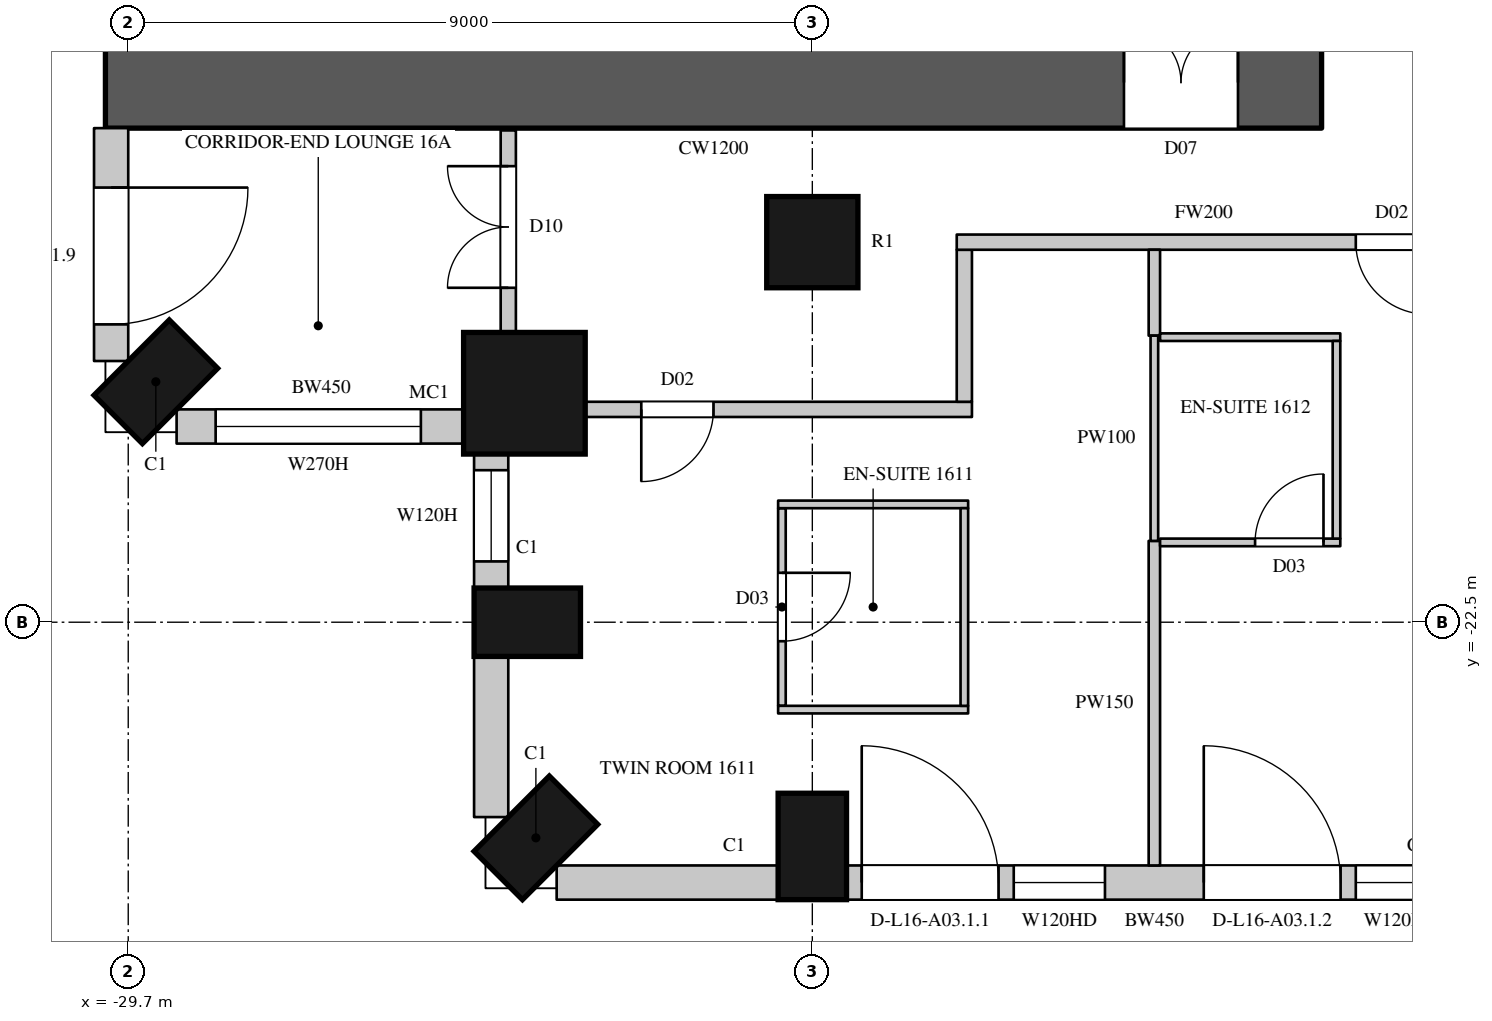
"""IFC4 building model, lengths in metres.
Left out: names, types, materials, properties, quantities, classifications, styles, units other than length and angle.
Written with IfcOpenShell. Run it as: python <this file> out.ifc"""

import sys

from ifc_helpers import new_model, si_unit, direction, frame, frame_2d, origin, origin_2d, place, context, subcontext, project, spatial, rectangle, circle, extrude, element, fill, save


model = new_model("IFC4")
c1 = context("Model", 3, precision=1e-05, world=origin(), true_north=direction((0.0, 1.0)))
c2 = subcontext(c1, "Body", "Model", "MODEL_VIEW")
j1 = project(units=[si_unit("LENGTHUNIT", "METRE"), si_unit("PLANEANGLEUNIT", "RADIAN")], contexts=[c1])
p1 = place(None, origin())
s1 = spatial("IfcSite", under=j1, at=p1, CompositionType="ELEMENT")
p2 = place(p1, origin())
s2 = spatial("IfcBuilding", under=s1, at=p2, CompositionType="ELEMENT")
p3 = place(p2, frame((0.0, 0.0, 87.9)))
s3 = spatial("IfcBuildingStorey", under=s2, at=p3, CompositionType="ELEMENT", Elevation=87.9)
p4 = place(p3, frame((-29.337, -19.337, 0.0), z_axis=(0.0, 0.0, 1.0), x_axis=(0.707106781187, -0.707106781187, 0.0)))
e1 = element("IfcColumn", 1, at=p4, inside=s3, PredefinedType="COLUMN", context=c2, shape_type="SweptSolid", body=[
    extrude(rectangle(XDim=0.9, YDim=1.4, at=origin_2d()), origin(), (0.0, 0.0, 1.0), 3.6),
])
p5 = place(p3, frame((-24.488, -19.488, 0.0), z_axis=(0.0, 0.0, 1.0), x_axis=(1.0, 0.0, 0.0)))
e2 = element("IfcColumn", 2, at=p5, inside=s3, PredefinedType="COLUMN", context=c2, shape_type="SweptSolid", body=[
    extrude(circle(Radius=0.8, at=origin_2d()), origin(), (0.0, 0.0, 1.0), 3.6),
])
for number, where, z_axis, x_axis in (
    (3, (-24.45, -22.5, 0.0), (0.0, 0.0, 1.0), (0.0, -1.0, 0.0)),
    (4, (-24.337, -25.337, 0.0), (0.0, 0.0, 1.0), (0.707, -0.707, 0.0)),
    (5, (-20.7, -25.45, 0.0), (0.0, 0.0, 1.0), (1.0, 0.0, 0.0)),
):
    element("IfcColumn", number, at=place(p3, frame(where, z_axis=z_axis, x_axis=x_axis)), inside=s3, PredefinedType="COLUMN", context=c2, shape_type="SweptSolid", body=[
        extrude(rectangle(XDim=0.9, YDim=1.4, at=origin_2d()), origin(), (0.0, 0.0, 1.0), 3.6),
    ])
p6 = place(p3, frame((-20.7, -17.5, 0.0), z_axis=(0.0, 0.0, 1.0), x_axis=(1.0, 0.0, 0.0)))
e6 = element("IfcColumn", 6, at=p6, inside=s3, PredefinedType="COLUMN", context=c2, shape_type="SweptSolid", body=[
    extrude(circle(Radius=0.6, at=origin_2d()), origin(), (0.0, 0.0, 1.0), 3.6),
])
p7 = place(p3, frame((-29.925, -16.0, 0.0), z_axis=(0.0, 0.0, 1.0), x_axis=(0.0, -1.0, 0.0)))
e7 = element("IfcWall", 7, at=p7, inside=s3, PredefinedType="SOLIDWALL", context=c2, shape_type="SweptSolid", body=[
    extrude(rectangle(XDim=3.064, YDim=0.45, at=frame_2d((1.532, 0.0))), origin(), (0.0, 0.0, 1.0), 3.3),
])
p8 = place(p7, frame((0.782, 0.0, 0.0)))
e8 = element("IfcOpeningElement", 8, at=p8, cuts=e7, PredefinedType="OPENING", context=c2, shape_type="SweptSolid", body=[
    extrude(rectangle(XDim=1.8, YDim=2.4, at=frame_2d((0.9, 1.2))), frame((0.0, 0.235, 0.0), z_axis=(0.0, -1.0, 0.0), x_axis=(1.0, 0.0, 0.0)), (0.0, 0.0, 1.0), 0.47),
])
p9 = place(p3, frame((-29.064, -19.925, 0.0), z_axis=(0.0, 0.0, 1.0), x_axis=(1.0, 0.0, 0.0)))
e9 = element("IfcWall", 9, at=p9, inside=s3, PredefinedType="SOLIDWALL", context=c2, shape_type="SweptSolid", body=[
    extrude(rectangle(XDim=3.805, YDim=0.45, at=frame_2d((1.903, 0.0))), origin(), (0.0, 0.0, 1.0), 3.3),
])
p10 = place(p9, frame((0.514, 0.0, 1.05)))
e10 = element("IfcOpeningElement", 10, at=p10, cuts=e9, PredefinedType="OPENING", context=c2, shape_type="SweptSolid", body=[
    extrude(rectangle(XDim=2.7, YDim=2.0, at=frame_2d((1.35, 1.0))), frame((0.0, 0.235, 0.0), z_axis=(0.0, -1.0, 0.0), x_axis=(1.0, 0.0, 0.0)), (0.0, 0.0, 1.0), 0.47),
])
p11 = place(p3, frame((-24.925, -20.259, 0.0), z_axis=(0.0, 0.0, 1.0), x_axis=(0.0, -1.0, 0.0)))
e11 = element("IfcWall", 11, at=p11, inside=s3, PredefinedType="SOLIDWALL", context=c2, shape_type="SweptSolid", body=[
    extrude(rectangle(XDim=1.792, YDim=0.45, at=frame_2d((0.896, 0.0))), origin(), (0.0, 0.0, 1.0), 3.3),
])
p12 = place(p11, frame((0.241, 0.0, 1.05)))
e12 = element("IfcOpeningElement", 12, at=p12, cuts=e11, PredefinedType="OPENING", context=c2, shape_type="SweptSolid", body=[
    extrude(rectangle(XDim=1.2, YDim=2.0, at=frame_2d((0.6, 1.0))), frame((0.0, 0.235, 0.0), z_axis=(0.0, -1.0, 0.0), x_axis=(1.0, 0.0, 0.0)), (0.0, 0.0, 1.0), 0.47),
])
p13 = place(p3, frame((-24.925, -22.95, 0.0), z_axis=(0.0, 0.0, 1.0), x_axis=(0.0, -1.0, 0.0)))
e13 = element("IfcWall", 13, at=p13, inside=s3, PredefinedType="SOLIDWALL", context=c2, shape_type="SweptSolid", body=[
    extrude(rectangle(XDim=2.114, YDim=0.45, at=frame_2d((1.057, 0.0))), origin(), (0.0, 0.0, 1.0), 3.3),
])
p14 = place(p3, frame((-24.064, -25.925, 0.0), z_axis=(0.0, 0.0, 1.0), x_axis=(1.0, 0.0, 0.0)))
e14 = element("IfcWall", 14, at=p14, inside=s3, PredefinedType="SOLIDWALL", context=c2, shape_type="SweptSolid", body=[
    extrude(rectangle(XDim=2.914, YDim=0.45, at=frame_2d((1.457, 0.0))), origin(), (0.0, 0.0, 1.0), 3.3),
])
p15 = place(p3, frame((-20.25, -25.925, 0.0), z_axis=(0.0, 0.0, 1.0), x_axis=(1.0, 0.0, 0.0)))
e15 = element("IfcWall", 15, at=p15, inside=s3, PredefinedType="SOLIDWALL", context=c2, shape_type="SweptSolid", body=[
    extrude(rectangle(XDim=8.1, YDim=0.45, at=frame_2d((4.05, 0.0))), origin(), (0.0, 0.0, 1.0), 3.3),
])
p16 = place(p15, frame((0.2, 0.0, 0.0)))
e16 = element("IfcOpeningElement", 16, at=p16, cuts=e15, PredefinedType="OPENING", context=c2, shape_type="SweptSolid", body=[
    extrude(rectangle(XDim=1.8, YDim=2.4, at=frame_2d((0.9, 1.2))), frame((0.0, 0.235, 0.0), z_axis=(0.0, -1.0, 0.0), x_axis=(1.0, 0.0, 0.0)), (0.0, 0.0, 1.0), 0.47),
])
p17 = place(p15, frame((2.2, 0.0, 1.05)))
e17 = element("IfcOpeningElement", 17, at=p17, cuts=e15, PredefinedType="OPENING", context=c2, shape_type="SweptSolid", body=[
    extrude(rectangle(XDim=1.2, YDim=2.0, at=frame_2d((0.6, 1.0))), frame((0.0, 0.235, 0.0), z_axis=(0.0, -1.0, 0.0), x_axis=(1.0, 0.0, 0.0)), (0.0, 0.0, 1.0), 0.47),
])
p18 = place(p15, frame((4.7, 0.0, 0.0)))
e18 = element("IfcOpeningElement", 18, at=p18, cuts=e15, PredefinedType="OPENING", context=c2, shape_type="SweptSolid", body=[
    extrude(rectangle(XDim=1.8, YDim=2.4, at=frame_2d((0.9, 1.2))), frame((0.0, 0.235, 0.0), z_axis=(0.0, -1.0, 0.0), x_axis=(1.0, 0.0, 0.0)), (0.0, 0.0, 1.0), 0.47),
])
p19 = place(p15, frame((6.7, 0.0, 1.05)))
e19 = element("IfcOpeningElement", 19, at=p19, cuts=e15, PredefinedType="OPENING", context=c2, shape_type="SweptSolid", body=[
    extrude(rectangle(XDim=1.2, YDim=2.0, at=frame_2d((0.6, 1.0))), frame((0.0, 0.235, 0.0), z_axis=(0.0, -1.0, 0.0), x_axis=(1.0, 0.0, 0.0)), (0.0, 0.0, 1.0), 0.47),
])
p20 = place(p3, frame((-30.0, -15.4, 0.0), z_axis=(0.0, 0.0, 1.0), x_axis=(1.0, 0.0, 0.0)))
e20 = element("IfcWall", 20, at=p20, inside=s3, PredefinedType="SHEAR", context=c2, shape_type="SweptSolid", body=[
    extrude(rectangle(XDim=16.0, YDim=1.2, at=frame_2d((8.0, 0.0))), origin(), (0.0, 0.0, 1.0), 3.6),
])
p21 = place(p20, frame((13.4, 0.0, 0.0)))
e21 = element("IfcOpeningElement", 21, at=p21, cuts=e20, PredefinedType="OPENING", context=c2, shape_type="SweptSolid", body=[
    extrude(rectangle(XDim=1.5, YDim=2.4, at=frame_2d((0.75, 1.2))), frame((0.0, 0.61, 0.0), z_axis=(0.0, -1.0, 0.0), x_axis=(1.0, 0.0, 0.0)), (0.0, 0.0, 1.0), 1.22),
])
p22 = place(p3, frame((-24.7, -18.7, 0.0), z_axis=(0.0, 0.0, 1.0), x_axis=(0.0, 1.0, 0.0)))
e22 = element("IfcWall", 22, at=p22, inside=s3, PredefinedType="PARTITIONING", context=c2, shape_type="SweptSolid", body=[
    extrude(rectangle(XDim=2.67, YDim=0.2, at=frame_2d((1.335, 0.0))), origin(), (0.0, 0.0, 1.0), 3.3),
])
p23 = place(p22, frame((0.6, 0.0, 0.0)))
e23 = element("IfcOpeningElement", 23, at=p23, cuts=e22, PredefinedType="OPENING", context=c2, shape_type="SweptSolid", body=[
    extrude(rectangle(XDim=1.6, YDim=2.4, at=frame_2d((0.8, 1.2))), frame((0.0, 0.11, 0.0), z_axis=(0.0, -1.0, 0.0), x_axis=(1.0, 0.0, 0.0)), (0.0, 0.0, 1.0), 0.22),
])
p24 = place(p3, frame((-23.7, -19.7, 0.0), z_axis=(0.0, 0.0, 1.0), x_axis=(1.0, 0.0, 0.0)))
e24 = element("IfcWall", 24, at=p24, inside=s3, PredefinedType="PARTITIONING", context=c2, shape_type="SweptSolid", body=[
    extrude(rectangle(XDim=5.1, YDim=0.2, at=frame_2d((2.55, 0.0))), origin(), (0.0, 0.0, 1.0), 3.3),
])
p25 = place(p24, frame((0.75, 0.0, 0.0)))
e25 = element("IfcOpeningElement", 25, at=p25, cuts=e24, PredefinedType="OPENING", context=c2, shape_type="SweptSolid", body=[
    extrude(rectangle(XDim=0.95, YDim=2.2, at=frame_2d((0.475, 1.1))), frame((0.0, 0.11, 0.0), z_axis=(0.0, -1.0, 0.0), x_axis=(1.0, 0.0, 0.0)), (0.0, 0.0, 1.0), 0.22),
])
p26 = place(p3, frame((-18.7, -19.6, 0.0), z_axis=(0.0, 0.0, 1.0), x_axis=(0.0, 1.0, 0.0)))
e26 = element("IfcWall", 26, at=p26, inside=s3, PredefinedType="PARTITIONING", context=c2, shape_type="SweptSolid", body=[
    extrude(rectangle(XDim=2.0, YDim=0.2, at=frame_2d((1.0, 0.0))), origin(), (0.0, 0.0, 1.0), 3.3),
])
p27 = place(p3, frame((-18.8, -17.5, 0.0), z_axis=(0.0, 0.0, 1.0), x_axis=(1.0, 0.0, 0.0)))
e27 = element("IfcWall", 27, at=p27, inside=s3, PredefinedType="PARTITIONING", context=c2, shape_type="SweptSolid", body=[
    extrude(rectangle(XDim=6.5, YDim=0.2, at=frame_2d((3.25, 0.0))), origin(), (0.0, 0.0, 1.0), 2.75),
])
p28 = place(p27, frame((5.25, 0.0, 0.0)))
e28 = element("IfcOpeningElement", 28, at=p28, cuts=e27, PredefinedType="OPENING", context=c2, shape_type="SweptSolid", body=[
    extrude(rectangle(XDim=0.95, YDim=2.2, at=frame_2d((0.475, 1.1))), frame((0.0, 0.11, 0.0), z_axis=(0.0, -1.0, 0.0), x_axis=(1.0, 0.0, 0.0)), (0.0, 0.0, 1.0), 0.22),
])
p29 = place(p3, frame((-16.2, -25.7, 0.0), z_axis=(0.0, 0.0, 1.0), x_axis=(0.0, 1.0, 0.0)))
e29 = element("IfcWall", 29, at=p29, inside=s3, PredefinedType="PARTITIONING", context=c2, shape_type="SweptSolid", body=[
    extrude(rectangle(XDim=4.27, YDim=0.15, at=frame_2d((2.135, 0.0))), origin(), (0.0, 0.0, 1.0), 2.65),
])
p30 = place(p3, frame((-16.2, -18.73, 0.0), z_axis=(0.0, 0.0, 1.0), x_axis=(0.0, 1.0, 0.0)))
e30 = element("IfcWall", 30, at=p30, inside=s3, PredefinedType="PARTITIONING", context=c2, shape_type="SweptSolid", body=[
    extrude(rectangle(XDim=1.13, YDim=0.15, at=frame_2d((0.565, 0.0))), origin(), (0.0, 0.0, 1.0), 2.65),
])
p31 = place(p3, frame((-21.1, -23.6, 0.0), z_axis=(0.0, 0.0, 1.0), x_axis=(0.0, 1.0, 0.0)))
e31 = element("IfcWall", 31, at=p31, inside=s3, PredefinedType="PARTITIONING", context=c2, shape_type="SweptSolid", body=[
    extrude(rectangle(XDim=2.6, YDim=0.1, at=frame_2d((1.3, 0.0))), origin(), (0.0, 0.0, 1.0), 3.3),
])
p32 = place(p31, frame((0.85, 0.0, 0.0)))
e32 = element("IfcOpeningElement", 32, at=p32, cuts=e31, PredefinedType="OPENING", context=c2, shape_type="SweptSolid", body=[
    extrude(rectangle(XDim=0.9, YDim=2.2, at=frame_2d((0.45, 1.1))), frame((0.0, 0.06, 0.0), z_axis=(0.0, -1.0, 0.0), x_axis=(1.0, 0.0, 0.0)), (0.0, 0.0, 1.0), 0.12),
])
for number, where, z_axis, x_axis in (
    (33, (-21.15, -23.65, 0.0), (0.0, 0.0, 1.0), (1.0, 0.0, 0.0)),
    (34, (-21.15, -20.95, 0.0), (0.0, 0.0, 1.0), (1.0, 0.0, 0.0)),
):
    element("IfcWall", number, at=place(p3, frame(where, z_axis=z_axis, x_axis=x_axis)), inside=s3, PredefinedType="PARTITIONING", context=c2, shape_type="SweptSolid", body=[
        extrude(rectangle(XDim=2.5, YDim=0.1, at=frame_2d((1.25, 0.0))), origin(), (0.0, 0.0, 1.0), 3.3),
    ])
p33 = place(p3, frame((-18.7, -23.6, 0.0), z_axis=(0.0, 0.0, 1.0), x_axis=(0.0, 1.0, 0.0)))
e35 = element("IfcWall", 35, at=p33, inside=s3, PredefinedType="PARTITIONING", context=c2, shape_type="SweptSolid", body=[
    extrude(rectangle(XDim=2.6, YDim=0.1, at=frame_2d((1.3, 0.0))), origin(), (0.0, 0.0, 1.0), 3.3),
])
p34 = place(p3, frame((-16.2, -21.43, 0.0), z_axis=(0.0, 0.0, 1.0), x_axis=(0.0, 1.0, 0.0)))
e36 = element("IfcWall", 36, at=p34, inside=s3, PredefinedType="PARTITIONING", context=c2, shape_type="SweptSolid", body=[
    extrude(rectangle(XDim=2.7, YDim=0.1, at=frame_2d((1.35, 0.0))), origin(), (0.0, 0.0, 1.0), 2.65),
])
p35 = place(p3, frame((-16.125, -21.45, 0.0), z_axis=(0.0, 0.0, 1.0), x_axis=(1.0, 0.0, 0.0)))
e37 = element("IfcWall", 37, at=p35, inside=s3, PredefinedType="PARTITIONING", context=c2, shape_type="SweptSolid", body=[
    extrude(rectangle(XDim=2.371, YDim=0.1, at=frame_2d((1.186, 0.0))), origin(), (0.0, 0.0, 1.0), 3.3),
])
p36 = place(p35, frame((1.25, 0.0, 0.0)))
e38 = element("IfcOpeningElement", 38, at=p36, cuts=e37, PredefinedType="OPENING", context=c2, shape_type="SweptSolid", body=[
    extrude(rectangle(XDim=0.9, YDim=2.2, at=frame_2d((0.45, 1.1))), frame((0.0, 0.06, 0.0), z_axis=(0.0, -1.0, 0.0), x_axis=(1.0, 0.0, 0.0)), (0.0, 0.0, 1.0), 0.12),
])
p37 = place(p3, frame((-16.125, -18.75, 0.0), z_axis=(0.0, 0.0, 1.0), x_axis=(1.0, 0.0, 0.0)))
e39 = element("IfcWall", 39, at=p37, inside=s3, PredefinedType="PARTITIONING", context=c2, shape_type="SweptSolid", body=[
    extrude(rectangle(XDim=2.371, YDim=0.1, at=frame_2d((1.186, 0.0))), origin(), (0.0, 0.0, 1.0), 3.3),
])
p38 = place(p3, frame((-13.804, -21.4, 0.0), z_axis=(0.0, 0.0, 1.0), x_axis=(0.0, 1.0, 0.0)))
e40 = element("IfcWall", 40, at=p38, inside=s3, PredefinedType="PARTITIONING", context=c2, shape_type="SweptSolid", body=[
    extrude(rectangle(XDim=2.6, YDim=0.1, at=frame_2d((1.3, 0.0))), origin(), (0.0, 0.0, 1.0), 3.3),
])
p39 = place(p8, origin())
e41 = element("IfcDoor", 41, at=p39, inside=s3, OperationType="SLIDING_TO_LEFT", PredefinedType="DOOR", context=c2, shape_type="SweptSolid", body=[
    extrude(rectangle(XDim=1.8, YDim=2.4, at=frame_2d((0.9, 1.2))), frame((0.0, 0.13, 0.0), z_axis=(0.0, -1.0, 0.0), x_axis=(1.0, 0.0, 0.0)), (0.0, 0.0, 1.0), 0.05),
])
fill(e8, e41)
p40 = place(p10, origin())
e42 = element("IfcWindow", 42, at=p40, inside=s3, PartitioningType="SINGLE_PANEL", PredefinedType="WINDOW", context=c2, shape_type="SweptSolid", body=[
    extrude(rectangle(XDim=2.7, YDim=2.0, at=frame_2d((1.35, 1.0))), frame((0.0, 0.135, 0.0), z_axis=(0.0, -1.0, 0.0), x_axis=(1.0, 0.0, 0.0)), (0.0, 0.0, 1.0), 0.06),
])
fill(e10, e42)
p41 = place(p12, origin())
e43 = element("IfcWindow", 43, at=p41, inside=s3, PartitioningType="SINGLE_PANEL", PredefinedType="WINDOW", context=c2, shape_type="SweptSolid", body=[
    extrude(rectangle(XDim=1.2, YDim=2.0, at=frame_2d((0.6, 1.0))), frame((0.0, 0.135, 0.0), z_axis=(0.0, -1.0, 0.0), x_axis=(1.0, 0.0, 0.0)), (0.0, 0.0, 1.0), 0.06),
])
fill(e12, e43)
p42 = place(p16, origin())
e44 = element("IfcDoor", 44, at=p42, inside=s3, OperationType="SLIDING_TO_LEFT", PredefinedType="DOOR", context=c2, shape_type="SweptSolid", body=[
    extrude(rectangle(XDim=1.8, YDim=2.4, at=frame_2d((0.9, 1.2))), frame((0.0, 0.13, 0.0), z_axis=(0.0, -1.0, 0.0), x_axis=(1.0, 0.0, 0.0)), (0.0, 0.0, 1.0), 0.05),
])
fill(e16, e44)
p43 = place(p17, origin())
e45 = element("IfcWindow", 45, at=p43, inside=s3, PartitioningType="SINGLE_PANEL", PredefinedType="WINDOW", context=c2, shape_type="SweptSolid", body=[
    extrude(rectangle(XDim=1.2, YDim=2.0, at=frame_2d((0.6, 1.0))), frame((0.0, 0.135, 0.0), z_axis=(0.0, -1.0, 0.0), x_axis=(1.0, 0.0, 0.0)), (0.0, 0.0, 1.0), 0.06),
])
fill(e17, e45)
p44 = place(p18, origin())
e46 = element("IfcDoor", 46, at=p44, inside=s3, OperationType="SLIDING_TO_LEFT", PredefinedType="DOOR", context=c2, shape_type="SweptSolid", body=[
    extrude(rectangle(XDim=1.8, YDim=2.4, at=frame_2d((0.9, 1.2))), frame((0.0, 0.13, 0.0), z_axis=(0.0, -1.0, 0.0), x_axis=(1.0, 0.0, 0.0)), (0.0, 0.0, 1.0), 0.05),
])
fill(e18, e46)
p45 = place(p19, origin())
e47 = element("IfcWindow", 47, at=p45, inside=s3, PartitioningType="SINGLE_PANEL", PredefinedType="WINDOW", context=c2, shape_type="SweptSolid", body=[
    extrude(rectangle(XDim=1.2, YDim=2.0, at=frame_2d((0.6, 1.0))), frame((0.0, 0.135, 0.0), z_axis=(0.0, -1.0, 0.0), x_axis=(1.0, 0.0, 0.0)), (0.0, 0.0, 1.0), 0.06),
])
fill(e19, e47)
p46 = place(p23, origin())
e48 = element("IfcDoor", 48, at=p46, inside=s3, OperationType="DOUBLE_DOOR_SINGLE_SWING", PredefinedType="DOOR", context=c2, shape_type="SweptSolid", body=[
    extrude(rectangle(XDim=1.6, YDim=2.4, at=frame_2d((0.8, 1.2))), frame((0.0, 0.025, 0.0), z_axis=(0.0, -1.0, 0.0), x_axis=(1.0, 0.0, 0.0)), (0.0, 0.0, 1.0), 0.05),
])
fill(e23, e48)
p47 = place(p25, origin())
e49 = element("IfcDoor", 49, at=p47, inside=s3, OperationType="SINGLE_SWING_RIGHT", PredefinedType="DOOR", context=c2, shape_type="SweptSolid", body=[
    extrude(rectangle(XDim=0.95, YDim=2.2, at=frame_2d((0.475, 1.1))), frame((0.0, 0.025, 0.0), z_axis=(0.0, -1.0, 0.0), x_axis=(1.0, 0.0, 0.0)), (0.0, 0.0, 1.0), 0.05),
])
fill(e25, e49)
p48 = place(p32, origin())
e50 = element("IfcDoor", 50, at=p48, inside=s3, OperationType="SINGLE_SWING_LEFT", PredefinedType="DOOR", context=c2, shape_type="SweptSolid", body=[
    extrude(rectangle(XDim=0.9, YDim=2.2, at=frame_2d((0.45, 1.1))), frame((0.0, 0.025, 0.0), z_axis=(0.0, -1.0, 0.0), x_axis=(1.0, 0.0, 0.0)), (0.0, 0.0, 1.0), 0.05),
])
fill(e32, e50)
p49 = place(p28, origin())
e51 = element("IfcDoor", 51, at=p49, inside=s3, OperationType="SINGLE_SWING_LEFT", PredefinedType="DOOR", context=c2, shape_type="SweptSolid", body=[
    extrude(rectangle(XDim=0.95, YDim=2.2, at=frame_2d((0.475, 1.1))), frame((0.0, 0.025, 0.0), z_axis=(0.0, -1.0, 0.0), x_axis=(1.0, 0.0, 0.0)), (0.0, 0.0, 1.0), 0.05),
])
fill(e28, e51)
p50 = place(p36, origin())
e52 = element("IfcDoor", 52, at=p50, inside=s3, OperationType="SINGLE_SWING_RIGHT", PredefinedType="DOOR", context=c2, shape_type="SweptSolid", body=[
    extrude(rectangle(XDim=0.9, YDim=2.2, at=frame_2d((0.45, 1.1))), frame((0.0, 0.025, 0.0), z_axis=(0.0, -1.0, 0.0), x_axis=(1.0, 0.0, 0.0)), (0.0, 0.0, 1.0), 0.05),
])
fill(e38, e52)
p51 = place(p21, origin())
e53 = element("IfcDoor", 53, at=p51, inside=s3, OperationType="DOUBLE_DOOR_SINGLE_SWING", PredefinedType="DOOR", context=c2, shape_type="SweptSolid", body=[
    extrude(rectangle(XDim=1.5, YDim=2.4, at=frame_2d((0.75, 1.2))), frame((0.0, 0.025, 0.0), z_axis=(0.0, -1.0, 0.0), x_axis=(1.0, 0.0, 0.0)), (0.0, 0.0, 1.0), 0.05),
])
fill(e21, e53)
save(model, sys.argv[1])
